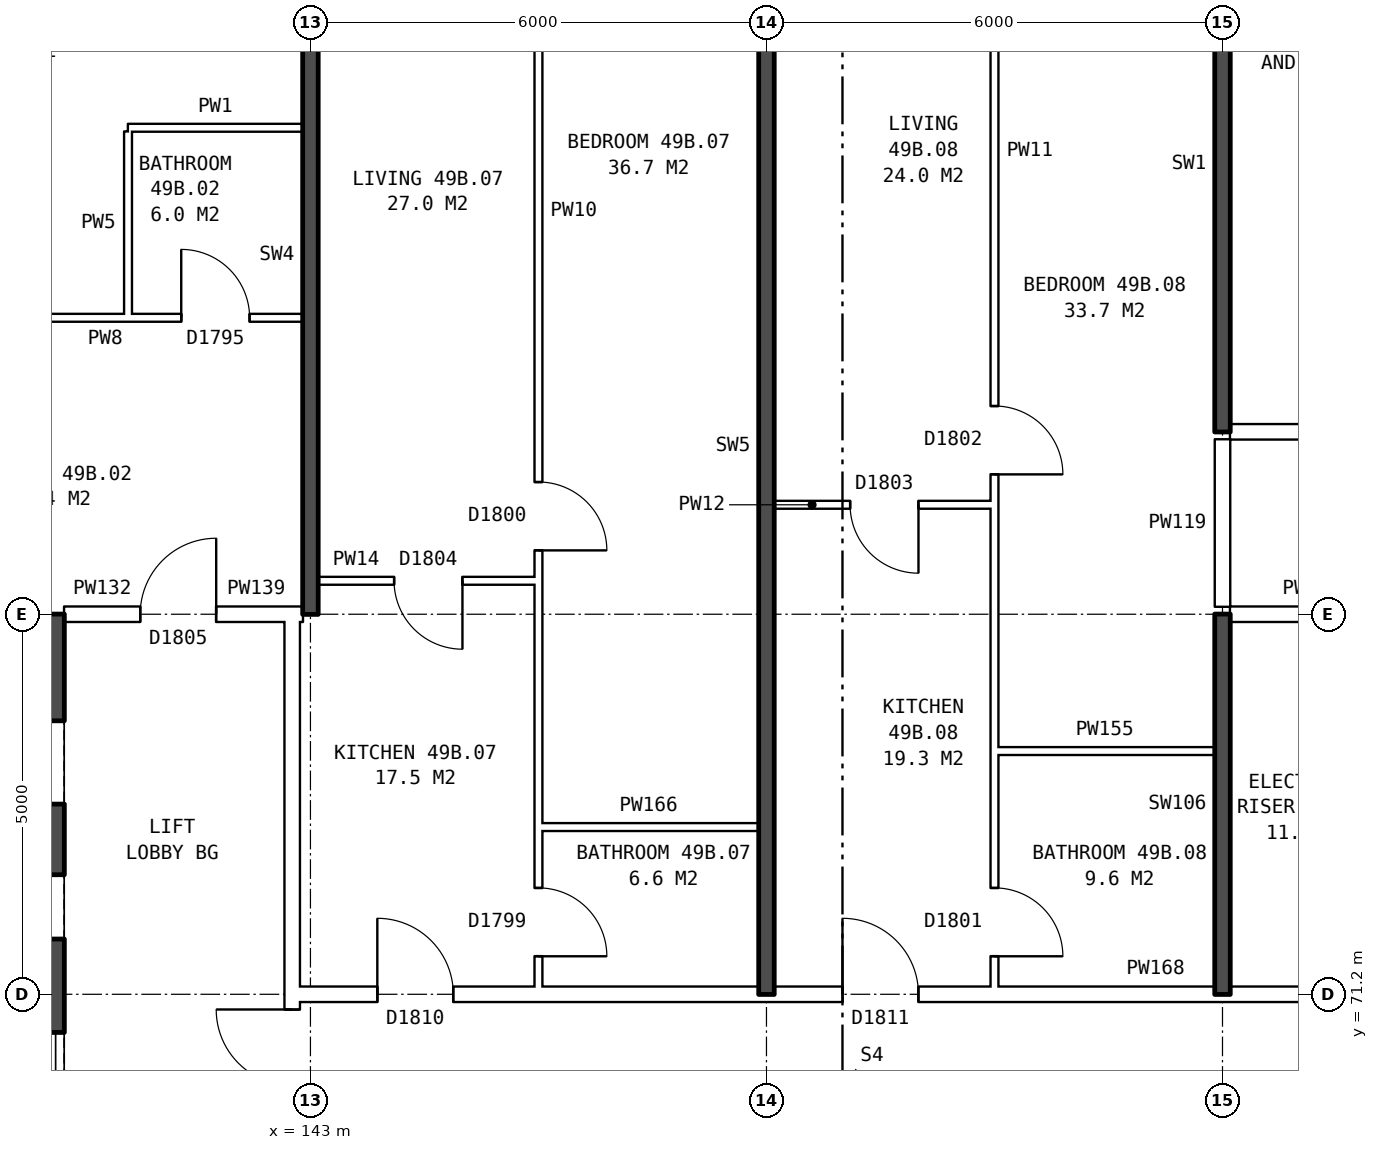
"""IFC4 building model, lengths in metres.
Left out: names, types, materials, properties, quantities, classifications, styles, units other than length and angle.
Written with IfcOpenShell. Run it as: python <this file> out.ifc"""

import sys

from ifc_helpers import new_model, si_unit, direction, frame, frame_2d, origin, place, context, subcontext, project, spatial, rectangle, extrude, element, fill, save


model = new_model("IFC4")
c1 = context("Model", 3, precision=1e-05, world=origin(), true_north=direction((0.0, 1.0)))
c2 = subcontext(c1, "Body", "Model", "MODEL_VIEW")
j1 = project(units=[si_unit("LENGTHUNIT", "METRE"), si_unit("PLANEANGLEUNIT", "RADIAN")], contexts=[c1])
p1 = place(None, origin())
s1 = spatial("IfcSite", under=j1, at=p1, CompositionType="ELEMENT")
p2 = place(p1, origin())
s2 = spatial("IfcBuilding", under=s1, at=p2, CompositionType="ELEMENT")
p3 = place(p2, frame((0.0, 0.0, 175.8)))
s3 = spatial("IfcBuildingStorey", under=s2, at=p3, CompositionType="ELEMENT", Elevation=175.8)
p4 = place(p3, frame((139.535, 63.8, 0.0), z_axis=(0.0, 0.0, 1.0), x_axis=(0.0, 1.0, 0.0)))
e1 = element("IfcWall", 1, at=p4, inside=s3, PredefinedType="SHEAR", context=c2, shape_type="SweptSolid", body=[
    extrude(rectangle(XDim=12.4, YDim=0.45, at=frame_2d((6.2, 0.0))), origin(), (0.0, 0.0, 1.0), 2.85),
])
p5 = place(p4, frame((1.325, 0.0, 0.0)))
e2 = element("IfcOpeningElement", 2, at=p5, cuts=e1, PredefinedType="OPENING", context=c2, shape_type="SweptSolid", body=[
    extrude(rectangle(XDim=1.1, YDim=2.1, at=frame_2d((0.55, 1.05))), frame((0.0, 0.235, 0.0), z_axis=(0.0, -1.0, 0.0), x_axis=(1.0, 0.0, 0.0)), (0.0, 0.0, 1.0), 0.47),
])
p6 = place(p4, frame((3.6, 0.0, 0.0)))
e3 = element("IfcOpeningElement", 3, at=p6, cuts=e1, PredefinedType="OPENING", context=c2, shape_type="SweptSolid", body=[
    extrude(rectangle(XDim=1.1, YDim=2.1, at=frame_2d((0.55, 1.05))), frame((0.0, 0.235, 0.0), z_axis=(0.0, -1.0, 0.0), x_axis=(1.0, 0.0, 0.0)), (0.0, 0.0, 1.0), 0.47),
])
p7 = place(p4, frame((5.8, 0.0, 0.0)))
e4 = element("IfcOpeningElement", 4, at=p7, cuts=e1, PredefinedType="OPENING", context=c2, shape_type="SweptSolid", body=[
    extrude(rectangle(XDim=1.1, YDim=2.1, at=frame_2d((0.55, 1.05))), frame((0.0, 0.235, 0.0), z_axis=(0.0, -1.0, 0.0), x_axis=(1.0, 0.0, 0.0)), (0.0, 0.0, 1.0), 0.47),
])
p8 = place(p4, frame((9.9, 0.0, 0.0)))
e5 = element("IfcOpeningElement", 5, at=p8, cuts=e1, PredefinedType="OPENING", context=c2, shape_type="SweptSolid", body=[
    extrude(rectangle(XDim=1.1, YDim=2.1, at=frame_2d((0.55, 1.05))), frame((0.0, 0.235, 0.0), z_axis=(0.0, -1.0, 0.0), x_axis=(1.0, 0.0, 0.0)), (0.0, 0.0, 1.0), 0.47),
])
p9 = place(p4, frame((8.125, 0.0, 0.0)))
e6 = element("IfcOpeningElement", 6, at=p9, cuts=e1, PredefinedType="OPENING", context=c2, shape_type="SweptSolid", body=[
    extrude(rectangle(XDim=0.85, YDim=2.1, at=frame_2d((0.425, 1.05))), frame((0.0, 0.235, 0.0), z_axis=(0.0, -1.0, 0.0), x_axis=(1.0, 0.0, 0.0)), (0.0, 0.0, 1.0), 0.47),
])
p10 = place(p3, frame((142.76, 63.9, 0.0), z_axis=(0.0, 0.0, 1.0), x_axis=(0.0, 1.0, 0.0)))
e7 = element("IfcWall", 7, at=p10, inside=s3, PredefinedType="PARTITIONING", context=c2, shape_type="SweptSolid", body=[
    extrude(rectangle(XDim=12.2, YDim=0.2, at=frame_2d((6.1, 0.0))), origin(), (0.0, 0.0, 1.0), 2.85),
])
p11 = place(p10, frame((5.1, 0.0, 0.0)))
e8 = element("IfcOpeningElement", 8, at=p11, cuts=e7, PredefinedType="OPENING", context=c2, shape_type="SweptSolid", body=[
    extrude(rectangle(XDim=2.0, YDim=2.1, at=frame_2d((1.0, 1.05))), frame((0.0, 0.11, 0.0), z_axis=(0.0, -1.0, 0.0), x_axis=(1.0, 0.0, 0.0)), (0.0, 0.0, 1.0), 0.22),
])
p12 = place(p3, frame((142.76, 71.2, 0.0), z_axis=(0.0, 0.0, 1.0), x_axis=(1.0, 0.0, 0.0)))
e9 = element("IfcWall", 9, at=p12, inside=s3, PredefinedType="PARTITIONING", context=c2, shape_type="SweptSolid", body=[
    extrude(rectangle(XDim=14.48, YDim=0.2, at=frame_2d((7.24, 0.0))), origin(), (0.0, 0.0, 1.0), 2.85),
])
p13 = place(p12, frame((1.12, 0.0, 0.0)))
e10 = element("IfcOpeningElement", 10, at=p13, cuts=e9, PredefinedType="OPENING", context=c2, shape_type="SweptSolid", body=[
    extrude(rectangle(XDim=1.0, YDim=2.1, at=frame_2d((0.5, 1.05))), frame((0.0, 0.11, 0.0), z_axis=(0.0, -1.0, 0.0), x_axis=(1.0, 0.0, 0.0)), (0.0, 0.0, 1.0), 0.22),
])
p14 = place(p12, frame((7.24, 0.0, 0.0)))
e11 = element("IfcOpeningElement", 11, at=p14, cuts=e9, PredefinedType="OPENING", context=c2, shape_type="SweptSolid", body=[
    extrude(rectangle(XDim=1.0, YDim=2.1, at=frame_2d((0.5, 1.05))), frame((0.0, 0.11, 0.0), z_axis=(0.0, -1.0, 0.0), x_axis=(1.0, 0.0, 0.0)), (0.0, 0.0, 1.0), 0.22),
])
for number, where, z_axis, x_axis in (
    (12, (146.0, 73.4, 0.0), (0.0, 0.0, 1.0), (1.0, 0.0, 0.0)),
    (13, (152.0, 74.4, 0.0), (0.0, 0.0, 1.0), (1.0, 0.0, 0.0)),
):
    element("IfcWall", number, at=place(p3, frame(where, z_axis=z_axis, x_axis=x_axis)), inside=s3, PredefinedType="PARTITIONING", context=c2, shape_type="SweptSolid", body=[
        extrude(rectangle(XDim=2.9, YDim=0.1, at=frame_2d((1.45, 0.0))), origin(), (0.0, 0.0, 1.0), 2.85),
    ])
p15 = place(p3, frame((139.76, 76.2, 0.0), z_axis=(0.0, 0.0, 1.0), x_axis=(1.0, 0.0, 0.0)))
e14 = element("IfcWall", 14, at=p15, inside=s3, PredefinedType="PARTITIONING", context=c2, shape_type="SweptSolid", body=[
    extrude(rectangle(XDim=3.0, YDim=0.2, at=frame_2d((1.5, 0.0))), origin(), (0.0, 0.0, 1.0), 2.85),
])
p16 = place(p15, frame((1.0, 0.0, 0.0)))
e15 = element("IfcOpeningElement", 15, at=p16, cuts=e14, PredefinedType="OPENING", context=c2, shape_type="SweptSolid", body=[
    extrude(rectangle(XDim=1.0, YDim=2.1, at=frame_2d((0.5, 1.05))), frame((0.0, 0.11, 0.0), z_axis=(0.0, -1.0, 0.0), x_axis=(1.0, 0.0, 0.0)), (0.0, 0.0, 1.0), 0.22),
])
p17 = place(p3, frame((142.76, 76.2, 0.0), z_axis=(0.0, 0.0, 1.0), x_axis=(1.0, 0.0, 0.0)))
e16 = element("IfcWall", 16, at=p17, inside=s3, PredefinedType="PARTITIONING", context=c2, shape_type="SweptSolid", body=[
    extrude(rectangle(XDim=0.14, YDim=0.2, at=frame_2d((0.07, 0.0))), origin(), (0.0, 0.0, 1.0), 2.85),
])
p18 = place(p3, frame((155.1, 76.2, 0.0), z_axis=(0.0, 0.0, 1.0), x_axis=(1.0, 0.0, 0.0)))
e17 = element("IfcWall", 17, at=p18, inside=s3, PredefinedType="PARTITIONING", context=c2, shape_type="SweptSolid", body=[
    extrude(rectangle(XDim=2.14, YDim=0.2, at=frame_2d((1.07, 0.0))), origin(), (0.0, 0.0, 1.0), 2.85),
])
p19 = place(p3, frame((143.1, 76.64, 0.0), z_axis=(0.0, 0.0, 1.0), x_axis=(1.0, 0.0, 0.0)))
e18 = element("IfcWall", 18, at=p19, inside=s3, PredefinedType="PARTITIONING", context=c2, shape_type="SweptSolid", body=[
    extrude(rectangle(XDim=2.9, YDim=0.1, at=frame_2d((1.45, 0.0))), origin(), (0.0, 0.0, 1.0), 2.85),
])
p20 = place(p19, frame((1.0, 0.0, 0.0)))
e19 = element("IfcOpeningElement", 19, at=p20, cuts=e18, PredefinedType="OPENING", context=c2, shape_type="SweptSolid", body=[
    extrude(rectangle(XDim=0.9, YDim=2.1, at=frame_2d((0.45, 1.05))), frame((0.0, 0.06, 0.0), z_axis=(0.0, -1.0, 0.0), x_axis=(1.0, 0.0, 0.0)), (0.0, 0.0, 1.0), 0.12),
])
p21 = place(p3, frame((149.1, 77.64, 0.0), z_axis=(0.0, 0.0, 1.0), x_axis=(1.0, 0.0, 0.0)))
e20 = element("IfcWall", 20, at=p21, inside=s3, PredefinedType="PARTITIONING", context=c2, shape_type="SweptSolid", body=[
    extrude(rectangle(XDim=2.9, YDim=0.1, at=frame_2d((1.45, 0.0))), origin(), (0.0, 0.0, 1.0), 2.85),
])
p22 = place(p21, frame((1.0, 0.0, 0.0)))
e21 = element("IfcOpeningElement", 21, at=p22, cuts=e20, PredefinedType="OPENING", context=c2, shape_type="SweptSolid", body=[
    extrude(rectangle(XDim=0.9, YDim=2.1, at=frame_2d((0.45, 1.05))), frame((0.0, 0.06, 0.0), z_axis=(0.0, -1.0, 0.0), x_axis=(1.0, 0.0, 0.0)), (0.0, 0.0, 1.0), 0.12),
])
p23 = place(p3, frame((155.1, 78.6, 0.0), z_axis=(0.0, 0.0, 1.0), x_axis=(1.0, 0.0, 0.0)))
e22 = element("IfcWall", 22, at=p23, inside=s3, PredefinedType="PARTITIONING", context=c2, shape_type="SweptSolid", body=[
    extrude(rectangle(XDim=14.79, YDim=0.2, at=frame_2d((7.395, 0.0))), origin(), (0.0, 0.0, 1.0), 2.85),
])
p24 = place(p23, frame((1.45, 0.0, 0.0)))
e23 = element("IfcOpeningElement", 23, at=p24, cuts=e22, PredefinedType="OPENING", context=c2, shape_type="SweptSolid", body=[
    extrude(rectangle(XDim=1.0, YDim=2.1, at=frame_2d((0.5, 1.05))), frame((0.0, 0.11, 0.0), z_axis=(0.0, -1.0, 0.0), x_axis=(1.0, 0.0, 0.0)), (0.0, 0.0, 1.0), 0.22),
])
p25 = place(p23, frame((11.045, 0.0, 0.0)))
e24 = element("IfcOpeningElement", 24, at=p25, cuts=e22, PredefinedType="OPENING", context=c2, shape_type="SweptSolid", body=[
    extrude(rectangle(XDim=1.0, YDim=2.1, at=frame_2d((0.5, 1.05))), frame((0.0, 0.11, 0.0), z_axis=(0.0, -1.0, 0.0), x_axis=(1.0, 0.0, 0.0)), (0.0, 0.0, 1.0), 0.22),
])
p26 = place(p3, frame((137.1, 80.1, 0.0), z_axis=(0.0, 0.0, 1.0), x_axis=(1.0, 0.0, 0.0)))
e25 = element("IfcWall", 25, at=p26, inside=s3, PredefinedType="PARTITIONING", context=c2, shape_type="SweptSolid", body=[
    extrude(rectangle(XDim=5.8, YDim=0.1, at=frame_2d((2.9, 0.0))), origin(), (0.0, 0.0, 1.0), 2.85),
])
p27 = place(p26, frame((1.3, 0.0, 0.0)))
e26 = element("IfcOpeningElement", 26, at=p27, cuts=e25, PredefinedType="OPENING", context=c2, shape_type="SweptSolid", body=[
    extrude(rectangle(XDim=0.9, YDim=2.1, at=frame_2d((0.45, 1.05))), frame((0.0, 0.06, 0.0), z_axis=(0.0, -1.0, 0.0), x_axis=(1.0, 0.0, 0.0)), (0.0, 0.0, 1.0), 0.12),
])
p28 = place(p26, frame((4.2, 0.0, 0.0)))
e27 = element("IfcOpeningElement", 27, at=p28, cuts=e25, PredefinedType="OPENING", context=c2, shape_type="SweptSolid", body=[
    extrude(rectangle(XDim=0.9, YDim=2.1, at=frame_2d((0.45, 1.05))), frame((0.0, 0.06, 0.0), z_axis=(0.0, -1.0, 0.0), x_axis=(1.0, 0.0, 0.0)), (0.0, 0.0, 1.0), 0.12),
])
p29 = place(p3, frame((140.6, 82.6, 0.0), z_axis=(0.0, 0.0, 1.0), x_axis=(1.0, 0.0, 0.0)))
e28 = element("IfcWall", 28, at=p29, inside=s3, PredefinedType="PARTITIONING", context=c2, shape_type="SweptSolid", body=[
    extrude(rectangle(XDim=2.3, YDim=0.1, at=frame_2d((1.15, 0.0))), origin(), (0.0, 0.0, 1.0), 2.85),
])
p30 = place(p3, frame((140.6, 80.15, 0.0), z_axis=(0.0, 0.0, 1.0), x_axis=(0.0, 1.0, 0.0)))
e29 = element("IfcWall", 29, at=p30, inside=s3, PredefinedType="PARTITIONING", context=c2, shape_type="SweptSolid", body=[
    extrude(rectangle(XDim=2.4, YDim=0.1, at=frame_2d((1.2, 0.0))), origin(), (0.0, 0.0, 1.0), 2.85),
])
p31 = place(p3, frame((143.0, 76.2, 0.0), z_axis=(0.0, 0.0, 1.0), x_axis=(0.0, 1.0, 0.0)))
e30 = element("IfcWall", 30, at=p31, inside=s3, PredefinedType="SOLIDWALL", context=c2, shape_type="SweptSolid", body=[
    extrude(rectangle(XDim=9.44, YDim=0.2, at=frame_2d((4.72, 0.0))), origin(), (0.0, 0.0, 1.0), 2.85),
])
p32 = place(p3, frame((146.0, 71.3, 0.0), z_axis=(0.0, 0.0, 1.0), x_axis=(0.0, 1.0, 0.0)))
e31 = element("IfcWall", 31, at=p32, inside=s3, PredefinedType="PARTITIONING", context=c2, shape_type="SweptSolid", body=[
    extrude(rectangle(XDim=14.34, YDim=0.1, at=frame_2d((7.17, 0.0))), origin(), (0.0, 0.0, 1.0), 2.85),
])
p33 = place(p32, frame((5.74, 0.0, 0.0)))
e32 = element("IfcOpeningElement", 32, at=p33, cuts=e31, PredefinedType="OPENING", context=c2, shape_type="SweptSolid", body=[
    extrude(rectangle(XDim=0.9, YDim=2.1, at=frame_2d((0.45, 1.05))), frame((0.0, 0.06, 0.0), z_axis=(0.0, -1.0, 0.0), x_axis=(1.0, 0.0, 0.0)), (0.0, 0.0, 1.0), 0.12),
])
p34 = place(p32, frame((0.4, 0.0, 0.0)))
e33 = element("IfcOpeningElement", 33, at=p34, cuts=e31, PredefinedType="OPENING", context=c2, shape_type="SweptSolid", body=[
    extrude(rectangle(XDim=0.9, YDim=2.1, at=frame_2d((0.45, 1.05))), frame((0.0, 0.06, 0.0), z_axis=(0.0, -1.0, 0.0), x_axis=(1.0, 0.0, 0.0)), (0.0, 0.0, 1.0), 0.12),
])
p35 = place(p3, frame((149.0, 71.2, 0.0), z_axis=(0.0, 0.0, 1.0), x_axis=(0.0, 1.0, 0.0)))
e34 = element("IfcWall", 34, at=p35, inside=s3, PredefinedType="SOLIDWALL", context=c2, shape_type="SweptSolid", body=[
    extrude(rectangle(XDim=14.44, YDim=0.2, at=frame_2d((7.22, 0.0))), origin(), (0.0, 0.0, 1.0), 2.85),
])
p36 = place(p3, frame((152.0, 71.3, 0.0), z_axis=(0.0, 0.0, 1.0), x_axis=(0.0, 1.0, 0.0)))
e35 = element("IfcWall", 35, at=p36, inside=s3, PredefinedType="PARTITIONING", context=c2, shape_type="SweptSolid", body=[
    extrude(rectangle(XDim=14.34, YDim=0.1, at=frame_2d((7.17, 0.0))), origin(), (0.0, 0.0, 1.0), 2.85),
])
p37 = place(p36, frame((6.74, 0.0, 0.0)))
e36 = element("IfcOpeningElement", 36, at=p37, cuts=e35, PredefinedType="OPENING", context=c2, shape_type="SweptSolid", body=[
    extrude(rectangle(XDim=0.9, YDim=2.1, at=frame_2d((0.45, 1.05))), frame((0.0, 0.06, 0.0), z_axis=(0.0, -1.0, 0.0), x_axis=(1.0, 0.0, 0.0)), (0.0, 0.0, 1.0), 0.12),
])
p38 = place(p36, frame((0.4, 0.0, 0.0)))
e37 = element("IfcOpeningElement", 37, at=p38, cuts=e35, PredefinedType="OPENING", context=c2, shape_type="SweptSolid", body=[
    extrude(rectangle(XDim=0.9, YDim=2.1, at=frame_2d((0.45, 1.05))), frame((0.0, 0.06, 0.0), z_axis=(0.0, -1.0, 0.0), x_axis=(1.0, 0.0, 0.0)), (0.0, 0.0, 1.0), 0.12),
])
p39 = place(p3, frame((155.0, 71.2, 0.0), z_axis=(0.0, 0.0, 1.0), x_axis=(0.0, 1.0, 0.0)))
e38 = element("IfcWall", 38, at=p39, inside=s3, PredefinedType="SOLIDWALL", context=c2, shape_type="SweptSolid", body=[
    extrude(rectangle(XDim=5.0, YDim=0.2, at=frame_2d((2.5, 0.0))), origin(), (0.0, 0.0, 1.0), 2.85),
])
p40 = place(p3, frame((155.0, 76.3, 0.0), z_axis=(0.0, 0.0, 1.0), x_axis=(0.0, 1.0, 0.0)))
e39 = element("IfcWall", 39, at=p40, inside=s3, PredefinedType="PARTITIONING", context=c2, shape_type="SweptSolid", body=[
    extrude(rectangle(XDim=2.2, YDim=0.2, at=frame_2d((1.1, 0.0))), origin(), (0.0, 0.0, 1.0), 2.85),
])
p41 = place(p3, frame((155.0, 78.6, 0.0), z_axis=(0.0, 0.0, 1.0), x_axis=(0.0, 1.0, 0.0)))
e40 = element("IfcWall", 40, at=p41, inside=s3, PredefinedType="SOLIDWALL", context=c2, shape_type="SweptSolid", body=[
    extrude(rectangle(XDim=7.04, YDim=0.2, at=frame_2d((3.52, 0.0))), origin(), (0.0, 0.0, 1.0), 2.85),
])
p42 = place(p11, origin())
e41 = element("IfcDoor", 41, at=p42, inside=s3, OperationType="DOUBLE_DOOR_SINGLE_SWING", PredefinedType="DOOR", context=c2, shape_type="SweptSolid", body=[
    extrude(rectangle(XDim=2.0, YDim=2.1, at=frame_2d((1.0, 1.05))), frame((0.0, 0.025, 0.0), z_axis=(0.0, -1.0, 0.0), x_axis=(1.0, 0.0, 0.0)), (0.0, 0.0, 1.0), 0.05),
])
fill(e8, e41)
p43 = place(p16, origin())
e42 = element("IfcDoor", 42, at=p43, inside=s3, OperationType="SINGLE_SWING_RIGHT", PredefinedType="DOOR", context=c2, shape_type="SweptSolid", body=[
    extrude(rectangle(XDim=1.0, YDim=2.1, at=frame_2d((0.5, 1.05))), frame((0.0, 0.025, 0.0), z_axis=(0.0, -1.0, 0.0), x_axis=(1.0, 0.0, 0.0)), (0.0, 0.0, 1.0), 0.05),
])
fill(e15, e42)
p44 = place(p28, origin())
e43 = element("IfcDoor", 43, at=p44, inside=s3, OperationType="SINGLE_SWING_LEFT", PredefinedType="DOOR", context=c2, shape_type="SweptSolid", body=[
    extrude(rectangle(XDim=0.9, YDim=2.1, at=frame_2d((0.45, 1.05))), frame((0.0, 0.025, 0.0), z_axis=(0.0, -1.0, 0.0), x_axis=(1.0, 0.0, 0.0)), (0.0, 0.0, 1.0), 0.05),
])
fill(e27, e43)
p45 = place(p33, frame((0.9, 0.0, 0.0), z_axis=(0.0, 0.0, 1.0), x_axis=(-1.0, 0.0, 0.0)))
e44 = element("IfcDoor", 44, at=p45, inside=s3, OperationType="SINGLE_SWING_RIGHT", PredefinedType="DOOR", context=c2, shape_type="SweptSolid", body=[
    extrude(rectangle(XDim=0.9, YDim=2.1, at=frame_2d((0.45, 1.05))), frame((0.0, 0.025, 0.0), z_axis=(0.0, -1.0, 0.0), x_axis=(1.0, 0.0, 0.0)), (0.0, 0.0, 1.0), 0.05),
])
fill(e32, e44)
p46 = place(p13, origin())
e45 = element("IfcDoor", 45, at=p46, inside=s3, OperationType="SINGLE_SWING_LEFT", PredefinedType="DOOR", context=c2, shape_type="SweptSolid", body=[
    extrude(rectangle(XDim=1.0, YDim=2.1, at=frame_2d((0.5, 1.05))), frame((0.0, 0.025, 0.0), z_axis=(0.0, -1.0, 0.0), x_axis=(1.0, 0.0, 0.0)), (0.0, 0.0, 1.0), 0.05),
])
fill(e10, e45)
p47 = place(p20, frame((0.9, 0.0, 0.0), z_axis=(0.0, 0.0, 1.0), x_axis=(-1.0, 0.0, 0.0)))
e46 = element("IfcDoor", 46, at=p47, inside=s3, OperationType="SINGLE_SWING_LEFT", PredefinedType="DOOR", context=c2, shape_type="SweptSolid", body=[
    extrude(rectangle(XDim=0.9, YDim=2.1, at=frame_2d((0.45, 1.05))), frame((0.0, 0.025, 0.0), z_axis=(0.0, -1.0, 0.0), x_axis=(1.0, 0.0, 0.0)), (0.0, 0.0, 1.0), 0.05),
])
fill(e19, e46)
p48 = place(p34, frame((0.9, 0.0, 0.0), z_axis=(0.0, 0.0, 1.0), x_axis=(-1.0, 0.0, 0.0)))
e47 = element("IfcDoor", 47, at=p48, inside=s3, OperationType="SINGLE_SWING_RIGHT", PredefinedType="DOOR", context=c2, shape_type="SweptSolid", body=[
    extrude(rectangle(XDim=0.9, YDim=2.1, at=frame_2d((0.45, 1.05))), frame((0.0, 0.025, 0.0), z_axis=(0.0, -1.0, 0.0), x_axis=(1.0, 0.0, 0.0)), (0.0, 0.0, 1.0), 0.05),
])
fill(e33, e47)
p49 = place(p37, frame((0.9, 0.0, 0.0), z_axis=(0.0, 0.0, 1.0), x_axis=(-1.0, 0.0, 0.0)))
e48 = element("IfcDoor", 48, at=p49, inside=s3, OperationType="SINGLE_SWING_RIGHT", PredefinedType="DOOR", context=c2, shape_type="SweptSolid", body=[
    extrude(rectangle(XDim=0.9, YDim=2.1, at=frame_2d((0.45, 1.05))), frame((0.0, 0.025, 0.0), z_axis=(0.0, -1.0, 0.0), x_axis=(1.0, 0.0, 0.0)), (0.0, 0.0, 1.0), 0.05),
])
fill(e36, e48)
p50 = place(p14, origin())
e49 = element("IfcDoor", 49, at=p50, inside=s3, OperationType="SINGLE_SWING_LEFT", PredefinedType="DOOR", context=c2, shape_type="SweptSolid", body=[
    extrude(rectangle(XDim=1.0, YDim=2.1, at=frame_2d((0.5, 1.05))), frame((0.0, 0.025, 0.0), z_axis=(0.0, -1.0, 0.0), x_axis=(1.0, 0.0, 0.0)), (0.0, 0.0, 1.0), 0.05),
])
fill(e11, e49)
p51 = place(p22, frame((0.9, 0.0, 0.0), z_axis=(0.0, 0.0, 1.0), x_axis=(-1.0, 0.0, 0.0)))
e50 = element("IfcDoor", 50, at=p51, inside=s3, OperationType="SINGLE_SWING_LEFT", PredefinedType="DOOR", context=c2, shape_type="SweptSolid", body=[
    extrude(rectangle(XDim=0.9, YDim=2.1, at=frame_2d((0.45, 1.05))), frame((0.0, 0.025, 0.0), z_axis=(0.0, -1.0, 0.0), x_axis=(1.0, 0.0, 0.0)), (0.0, 0.0, 1.0), 0.05),
])
fill(e21, e50)
p52 = place(p38, frame((0.9, 0.0, 0.0), z_axis=(0.0, 0.0, 1.0), x_axis=(-1.0, 0.0, 0.0)))
e51 = element("IfcDoor", 51, at=p52, inside=s3, OperationType="SINGLE_SWING_RIGHT", PredefinedType="DOOR", context=c2, shape_type="SweptSolid", body=[
    extrude(rectangle(XDim=0.9, YDim=2.1, at=frame_2d((0.45, 1.05))), frame((0.0, 0.025, 0.0), z_axis=(0.0, -1.0, 0.0), x_axis=(1.0, 0.0, 0.0)), (0.0, 0.0, 1.0), 0.05),
])
fill(e37, e51)
save(model, sys.argv[1])
